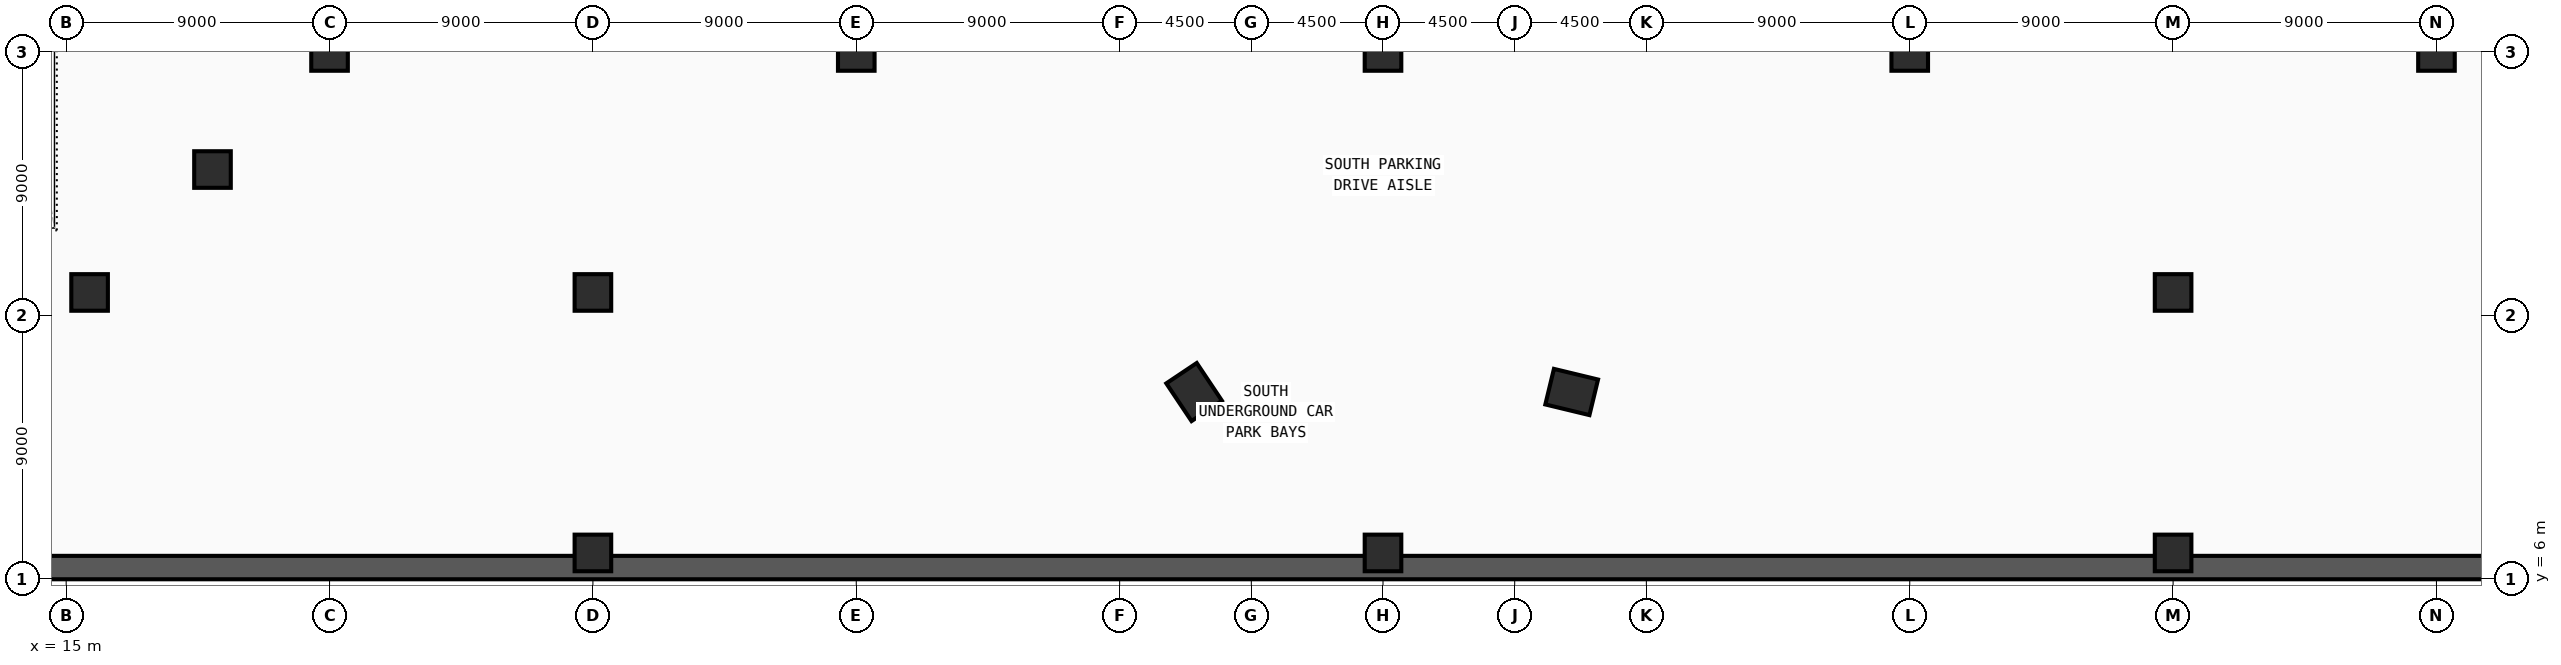
"""IFC4 building model, lengths in metres.
Left out: names, types, materials, properties, quantities, classifications, styles, units other than length and angle.
Written with IfcOpenShell. Run it as: python <this file> out.ifc"""

import sys

from ifc_helpers import new_model, si_unit, direction, frame, frame_2d, origin, origin_2d, place, context, subcontext, project, spatial, rectangle, extrude, source, transform, mapped, element, save


model = new_model("IFC4")
c1 = context("Model", 3, precision=1e-05, world=origin(), true_north=direction((0.0, 1.0)))
c2 = subcontext(c1, "Body", "Model", "MODEL_VIEW")
j1 = project(units=[si_unit("LENGTHUNIT", "METRE"), si_unit("PLANEANGLEUNIT", "RADIAN")], contexts=[c1])
p1 = place(None, origin())
s1 = spatial("IfcSite", under=j1, at=p1, CompositionType="ELEMENT")
p2 = place(p1, origin())
s2 = spatial("IfcBuilding", under=s1, at=p2, CompositionType="ELEMENT")
p3 = place(p2, frame((0.0, 0.0, -4.8)))
s3 = spatial("IfcBuildingStorey", under=s2, at=p3, CompositionType="ELEMENT", Elevation=-4.8)
m1 = source(origin(), c2, "Body", "SweptSolid", [
    extrude(rectangle(XDim=1.55, YDim=1.25, at=origin_2d()), origin(), (0.0, 0.0, 1.0), 4.8),
])
for number, where, z_axis, x_axis in (
    (1, (53.546, 12.397, 0.0), (0.0, 0.0, 1.0), (-0.556, 0.831, 0.0)),
    (2, (66.448, 12.399, 0.0), (0.0, 0.0, 1.0), (-0.972, 0.235, 0.0)),
):
    element("IfcColumn", number, at=place(p3, frame(where, z_axis=z_axis, x_axis=x_axis)), inside=s3, PredefinedType="COLUMN", context=c2, shape_type="MappedRepresentation", body=[
        mapped(m1, transform((0.0, 0.0, 0.0), x_axis=(1.0, 0.0, 0.0), y_axis=(0.0, 1.0, 0.0), z_axis=(0.0, 0.0, 1.0), scale=1.0)),
    ])
m2 = source(origin(), c2, "Body", "SweptSolid", [
    extrude(rectangle(XDim=1.25, YDim=1.25, at=origin_2d()), origin(), (0.0, 0.0, 1.0), 4.8),
])
for number, where, z_axis, x_axis in (
    (3, (24.0, 24.0, 0.0), (0.0, 0.0, 1.0), (1.0, 0.0, 0.0)),
    (4, (42.0, 24.0, 0.0), (0.0, 0.0, 1.0), (1.0, 0.0, 0.0)),
    (5, (60.0, 24.0, 0.0), (0.0, 0.0, 1.0), (1.0, 0.0, 0.0)),
    (6, (78.0, 24.0, 0.0), (0.0, 0.0, 1.0), (1.0, 0.0, 0.0)),
    (7, (96.0, 24.0, 0.0), (0.0, 0.0, 1.0), (1.0, 0.0, 0.0)),
    (8, (15.8, 15.8, 0.0), (0.0, 0.0, 1.0), (1.0, 0.0, 0.0)),
    (9, (33.0, 15.8, 0.0), (0.0, 0.0, 1.0), (1.0, 0.0, 0.0)),
    (10, (87.0, 15.8, 0.0), (0.0, 0.0, 1.0), (1.0, 0.0, 0.0)),
    (11, (20.0, 20.0, 0.0), (0.0, 0.0, 1.0), (1.0, 0.0, 0.0)),
    (12, (33.0, 6.9, 0.0), (0.0, 0.0, 1.0), (1.0, 0.0, 0.0)),
    (13, (60.0, 6.9, 0.0), (0.0, 0.0, 1.0), (1.0, 0.0, 0.0)),
    (14, (87.0, 6.9, 0.0), (0.0, 0.0, 1.0), (1.0, 0.0, 0.0)),
):
    element("IfcColumn", number, at=place(p3, frame(where, z_axis=z_axis, x_axis=x_axis)), inside=s3, PredefinedType="COLUMN", context=c2, shape_type="MappedRepresentation", body=[
        mapped(m2, transform((0.0, 0.0, 0.0), x_axis=(1.0, 0.0, 0.0), y_axis=(0.0, 1.0, 0.0), z_axis=(0.0, 0.0, 1.0), scale=1.0)),
    ])
p4 = place(p3, frame((113.2, 6.4, 0.0), z_axis=(0.0, 0.0, 1.0), x_axis=(-1.0, 0.0, 0.0)))
e15 = element("IfcWall", 15, at=p4, inside=s3, PredefinedType="USERDEFINED", context=c2, shape_type="SweptSolid", body=[
    extrude(rectangle(XDim=106.4, YDim=0.8, at=frame_2d((53.2, 0.0))), origin(), (0.0, 0.0, 1.0), 4.55),
])
save(model, sys.argv[1])
